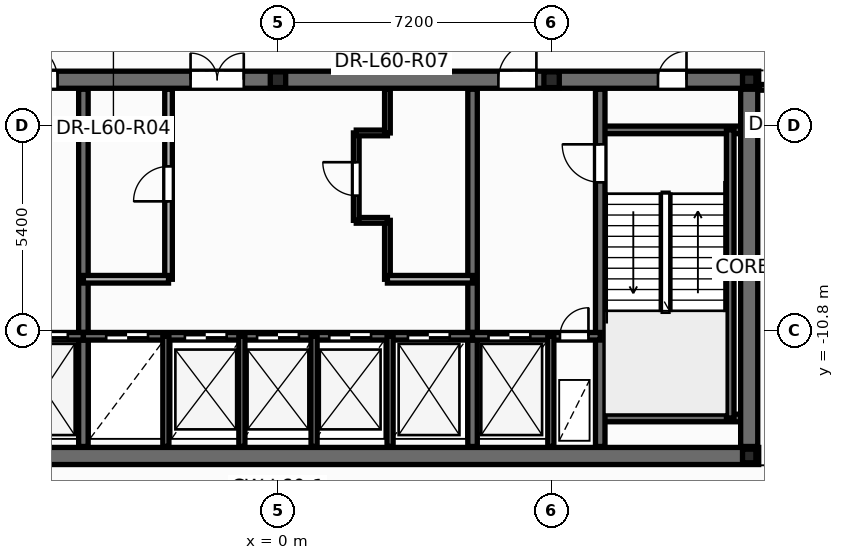
"""IFC4 building model, lengths in metres.
Left out: names, types, materials, properties, quantities, classifications, styles, units other than length and angle.
Written with IfcOpenShell. Run it as: python <this file> out.ifc"""

import sys

from ifc_helpers import new_model, si_unit, direction, frame, frame_2d, origin, origin_2d, place, context, subcontext, project, spatial, rectangle, i_section, extrude, element, fill, save


model = new_model("IFC4")
c1 = context("Model", 3, precision=1e-05, world=origin(), true_north=direction((0.0, 1.0)))
c2 = subcontext(c1, "Body", "Model", "MODEL_VIEW")
j1 = project(units=[si_unit("LENGTHUNIT", "METRE"), si_unit("PLANEANGLEUNIT", "RADIAN")], contexts=[c1])
p1 = place(None, origin())
s1 = spatial("IfcSite", under=j1, at=p1, CompositionType="ELEMENT")
p2 = place(p1, origin())
s2 = spatial("IfcBuilding", under=s1, at=p2, CompositionType="ELEMENT")
p3 = place(p2, frame((0.0, 0.0, 228.9)))
s3 = spatial("IfcBuildingStorey", under=s2, at=p3, CompositionType="ELEMENT", Elevation=228.9)
for number, where, z_axis, x_axis in (
    (1, (12.4, -14.1, 0.0), (0.0, 0.0, 1.0), (1.0, 0.0, 0.0)),
    (2, (12.4, -4.2, 0.0), (0.0, 0.0, 1.0), (1.0, 0.0, 0.0)),
):
    element("IfcColumn", number, at=place(p3, frame(where, z_axis=z_axis, x_axis=x_axis)), inside=s3, PredefinedType="COLUMN", context=c2, shape_type="SweptSolid", body=[
        extrude(i_section(OverallWidth=0.352, OverallDepth=0.359, WebThickness=0.018, FlangeThickness=0.026, at=origin_2d()), origin(), (0.0, 0.0, 1.0), 4.5),
    ])
for number, where, z_axis, x_axis in (
    (3, (0.0, -4.2, 0.0), (0.0, 0.0, 1.0), (1.0, 0.0, 0.0)),
    (4, (7.2, -4.2, 0.0), (0.0, 0.0, 1.0), (1.0, 0.0, 0.0)),
):
    element("IfcColumn", number, at=place(p3, frame(where, z_axis=z_axis, x_axis=x_axis)), inside=s3, PredefinedType="PILASTER", context=c2, shape_type="SweptSolid", body=[
        extrude(i_section(OverallWidth=0.405, OverallDepth=0.414, WebThickness=0.022, FlangeThickness=0.032, at=origin_2d()), origin(), (0.0, 0.0, 1.0), 4.5),
    ])
p4 = place(p3, frame((2.88, -9.45, 0.0), z_axis=(0.0, 0.0, 1.0), x_axis=(0.0, 1.0, 0.0)))
e5 = element("IfcWall", 5, at=p4, inside=s3, PredefinedType="PARTITIONING", context=c2, shape_type="SweptSolid", body=[
    extrude(rectangle(XDim=1.55, YDim=0.15, at=frame_2d((0.775, 0.0))), origin(), (0.0, 0.0, 1.0), 4.245),
])
p5 = place(p3, frame((2.06, -7.9, 0.0), z_axis=(0.0, 0.0, 1.0), x_axis=(1.0, 0.0, 0.0)))
e6 = element("IfcWall", 6, at=p5, inside=s3, PredefinedType="PARTITIONING", context=c2, shape_type="SweptSolid", body=[
    extrude(rectangle(XDim=0.82, YDim=0.15, at=frame_2d((0.41, 0.0))), origin(), (0.0, 0.0, 1.0), 4.245),
])
p6 = place(p3, frame((2.06, -7.9, 0.0), z_axis=(0.0, 0.0, 1.0), x_axis=(0.0, 1.0, 0.0)))
e7 = element("IfcWall", 7, at=p6, inside=s3, PredefinedType="PARTITIONING", context=c2, shape_type="SweptSolid", body=[
    extrude(rectangle(XDim=2.3, YDim=0.15, at=frame_2d((1.15, 0.0))), origin(), (0.0, 0.0, 1.0), 4.245),
])
p7 = place(p6, frame((0.65, 0.0, 0.0)))
e8 = element("IfcOpeningElement", 8, at=p7, cuts=e7, PredefinedType="OPENING", context=c2, shape_type="SweptSolid", body=[
    extrude(rectangle(XDim=0.886, YDim=2.104, at=frame_2d((0.44, 1.052))), frame((0.0, 0.085, 0.0), z_axis=(0.0, -1.0, 0.0), x_axis=(1.0, 0.0, 0.0)), (0.0, 0.0, 1.0), 0.17),
])
p8 = place(p3, frame((2.06, -5.6, 0.0), z_axis=(0.0, 0.0, 1.0), x_axis=(1.0, 0.0, 0.0)))
e9 = element("IfcWall", 9, at=p8, inside=s3, PredefinedType="PARTITIONING", context=c2, shape_type="SweptSolid", body=[
    extrude(rectangle(XDim=0.82, YDim=0.15, at=frame_2d((0.41, 0.0))), origin(), (0.0, 0.0, 1.0), 4.245),
])
p9 = place(p3, frame((2.88, -5.6, 0.0), z_axis=(0.0, 0.0, 1.0), x_axis=(0.0, 1.0, 0.0)))
e10 = element("IfcWall", 10, at=p9, inside=s3, PredefinedType="PARTITIONING", context=c2, shape_type="SweptSolid", body=[
    extrude(rectangle(XDim=1.15, YDim=0.15, at=frame_2d((0.575, 0.0))), origin(), (0.0, 0.0, 1.0), 4.245),
])
p10 = place(p3, frame((-12.65, -14.1, 0.0), z_axis=(0.0, 0.0, 1.0), x_axis=(1.0, 0.0, 0.0)))
e11 = element("IfcWall", 11, at=p10, inside=s3, PredefinedType="SHEAR", context=c2, shape_type="SweptSolid", body=[
    extrude(rectangle(XDim=25.3, YDim=0.45, at=frame_2d((12.65, 0.0))), origin(), (0.0, 0.0, 1.0), 4.5),
])
p11 = place(p3, frame((-12.65, -4.2, 0.0), z_axis=(0.0, 0.0, 1.0), x_axis=(1.0, 0.0, 0.0)))
e12 = element("IfcWall", 12, at=p11, inside=s3, PredefinedType="SHEAR", context=c2, shape_type="SweptSolid", body=[
    extrude(rectangle(XDim=25.3, YDim=0.45, at=frame_2d((12.65, 0.0))), origin(), (0.0, 0.0, 1.0), 4.5),
])
p12 = place(p11, frame((1.85, 0.0, 0.0)))
e13 = element("IfcOpeningElement", 13, at=p12, cuts=e12, PredefinedType="OPENING", context=c2, shape_type="SweptSolid", body=[
    extrude(rectangle(XDim=0.756, YDim=2.054, at=frame_2d((0.375, 1.027))), frame((0.0, 0.235, 0.0), z_axis=(0.0, -1.0, 0.0), x_axis=(1.0, 0.0, 0.0)), (0.0, 0.0, 1.0), 0.47),
])
p13 = place(p11, frame((22.65, 0.0, 0.0)))
e14 = element("IfcOpeningElement", 14, at=p13, cuts=e12, PredefinedType="OPENING", context=c2, shape_type="SweptSolid", body=[
    extrude(rectangle(XDim=0.756, YDim=2.054, at=frame_2d((0.375, 1.027))), frame((0.0, 0.235, 0.0), z_axis=(0.0, -1.0, 0.0), x_axis=(1.0, 0.0, 0.0)), (0.0, 0.0, 1.0), 0.47),
])
p14 = place(p11, frame((5.85, 0.0, 0.0)))
e15 = element("IfcOpeningElement", 15, at=p14, cuts=e12, PredefinedType="OPENING", context=c2, shape_type="SweptSolid", body=[
    extrude(rectangle(XDim=1.006, YDim=2.104, at=frame_2d((0.5, 1.052))), frame((0.0, 0.235, 0.0), z_axis=(0.0, -1.0, 0.0), x_axis=(1.0, 0.0, 0.0)), (0.0, 0.0, 1.0), 0.47),
])
p15 = place(p11, frame((10.35, 0.0, 0.0)))
e16 = element("IfcOpeningElement", 16, at=p15, cuts=e12, PredefinedType="OPENING", context=c2, shape_type="SweptSolid", body=[
    extrude(rectangle(XDim=1.406, YDim=2.154, at=frame_2d((0.7, 1.077))), frame((0.0, 0.235, 0.0), z_axis=(0.0, -1.0, 0.0), x_axis=(1.0, 0.0, 0.0)), (0.0, 0.0, 1.0), 0.47),
])
p16 = place(p11, frame((18.45, 0.0, 0.0)))
e17 = element("IfcOpeningElement", 17, at=p16, cuts=e12, PredefinedType="OPENING", context=c2, shape_type="SweptSolid", body=[
    extrude(rectangle(XDim=1.006, YDim=2.104, at=frame_2d((0.5, 1.052))), frame((0.0, 0.235, 0.0), z_axis=(0.0, -1.0, 0.0), x_axis=(1.0, 0.0, 0.0)), (0.0, 0.0, 1.0), 0.47),
])
for number, where, z_axis, x_axis in (
    (18, (8.48, -5.52, 0.0), (0.0, 0.0, 1.0), (1.0, 0.0, 0.0)),
    (19, (8.48, -13.1, 0.0), (0.0, 0.0, 1.0), (1.0, 0.0, 0.0)),
):
    element("IfcWall", number, at=place(p3, frame(where, z_axis=z_axis, x_axis=x_axis)), inside=s3, PredefinedType="SOLIDWALL", context=c2, shape_type="SweptSolid", body=[
        extrude(rectangle(XDim=3.87, YDim=0.2, at=frame_2d((1.935, 0.0))), origin(), (0.0, 0.0, 1.0), 4.5),
    ])
p17 = place(p3, frame((11.9, -13.1, 0.0), z_axis=(0.0, 0.0, 1.0), x_axis=(0.0, 1.0, 0.0)))
e20 = element("IfcWall", 20, at=p17, inside=s3, PredefinedType="SOLIDWALL", context=c2, shape_type="SweptSolid", body=[
    extrude(rectangle(XDim=7.58, YDim=0.2, at=frame_2d((3.79, 0.0))), origin(), (0.0, 0.0, 1.0), 4.5),
])
p18 = place(p3, frame((8.48, -13.85, 0.0), z_axis=(0.0, 0.0, 1.0), x_axis=(0.0, 1.0, 0.0)))
e21 = element("IfcWall", 21, at=p18, inside=s3, PredefinedType="SHEAR", context=c2, shape_type="SweptSolid", body=[
    extrude(rectangle(XDim=9.4, YDim=0.25, at=frame_2d((4.7, 0.0))), origin(), (0.0, 0.0, 1.0), 4.5),
])
p19 = place(p18, frame((6.95, 0.0, 0.0)))
e22 = element("IfcOpeningElement", 22, at=p19, cuts=e21, PredefinedType="OPENING", context=c2, shape_type="SweptSolid", body=[
    extrude(rectangle(XDim=1.006, YDim=2.104, at=frame_2d((0.5, 1.052))), frame((0.0, 0.135, 0.0), z_axis=(0.0, -1.0, 0.0), x_axis=(1.0, 0.0, 0.0)), (0.0, 0.0, 1.0), 0.27),
])
for number, where, z_axis, x_axis in (
    (23, (-5.12, -13.85, 0.0), (0.0, 0.0, 1.0), (0.0, 1.0, 0.0)),
    (24, (5.12, -13.85, 0.0), (0.0, 0.0, 1.0), (0.0, 1.0, 0.0)),
):
    element("IfcWall", number, at=place(p3, frame(where, z_axis=z_axis, x_axis=x_axis)), inside=s3, PredefinedType="SHEAR", context=c2, shape_type="SweptSolid", body=[
        extrude(rectangle(XDim=9.4, YDim=0.25, at=frame_2d((4.7, 0.0))), origin(), (0.0, 0.0, 1.0), 4.5),
    ])
p20 = place(p3, frame((-8.48, -10.95, 0.0), z_axis=(0.0, 0.0, 1.0), x_axis=(1.0, 0.0, 0.0)))
e25 = element("IfcWall", 25, at=p20, inside=s3, PredefinedType="SOLIDWALL", context=c2, shape_type="SweptSolid", body=[
    extrude(rectangle(XDim=3.36, YDim=0.2, at=frame_2d((1.68, 0.0))), origin(), (0.0, 0.0, 1.0), 4.5),
])
p21 = place(p20, frame((0.28, 0.0, 0.0)))
e26 = element("IfcOpeningElement", 26, at=p21, cuts=e25, PredefinedType="OPENING", context=c2, shape_type="SweptSolid", body=[
    extrude(rectangle(XDim=0.756, YDim=2.054, at=frame_2d((0.375, 1.027))), frame((0.0, 0.11, 0.0), z_axis=(0.0, -1.0, 0.0), x_axis=(1.0, 0.0, 0.0)), (0.0, 0.0, 1.0), 0.22),
])
p22 = place(p20, frame((1.85, 0.0, 0.0)))
e27 = element("IfcOpeningElement", 27, at=p22, cuts=e25, PredefinedType="OPENING", context=c2, shape_type="SweptSolid", body=[
    extrude(rectangle(XDim=1.106, YDim=2.104, at=frame_2d((0.55, 1.052))), frame((0.0, 0.11, 0.0), z_axis=(0.0, -1.0, 0.0), x_axis=(1.0, 0.0, 0.0)), (0.0, 0.0, 1.0), 0.22),
])
p23 = place(p3, frame((-5.12, -10.95, 0.0), z_axis=(0.0, 0.0, 1.0), x_axis=(1.0, 0.0, 0.0)))
e28 = element("IfcWall", 28, at=p23, inside=s3, PredefinedType="SOLIDWALL", context=c2, shape_type="SweptSolid", body=[
    extrude(rectangle(XDim=10.24, YDim=0.2, at=frame_2d((5.12, 0.0))), origin(), (0.0, 0.0, 1.0), 4.5),
])
p24 = place(p23, frame((0.6, 0.0, 0.0)))
e29 = element("IfcOpeningElement", 29, at=p24, cuts=e28, PredefinedType="OPENING", context=c2, shape_type="SweptSolid", body=[
    extrude(rectangle(XDim=1.106, YDim=2.104, at=frame_2d((0.55, 1.052))), frame((0.0, 0.11, 0.0), z_axis=(0.0, -1.0, 0.0), x_axis=(1.0, 0.0, 0.0)), (0.0, 0.0, 1.0), 0.22),
])
p25 = place(p23, frame((2.67, 0.0, 0.0)))
e30 = element("IfcOpeningElement", 30, at=p25, cuts=e28, PredefinedType="OPENING", context=c2, shape_type="SweptSolid", body=[
    extrude(rectangle(XDim=1.106, YDim=2.104, at=frame_2d((0.55, 1.052))), frame((0.0, 0.11, 0.0), z_axis=(0.0, -1.0, 0.0), x_axis=(1.0, 0.0, 0.0)), (0.0, 0.0, 1.0), 0.22),
])
p26 = place(p23, frame((4.57, 0.0, 0.0)))
e31 = element("IfcOpeningElement", 31, at=p26, cuts=e28, PredefinedType="OPENING", context=c2, shape_type="SweptSolid", body=[
    extrude(rectangle(XDim=1.106, YDim=2.104, at=frame_2d((0.55, 1.052))), frame((0.0, 0.11, 0.0), z_axis=(0.0, -1.0, 0.0), x_axis=(1.0, 0.0, 0.0)), (0.0, 0.0, 1.0), 0.22),
])
p27 = place(p23, frame((6.47, 0.0, 0.0)))
e32 = element("IfcOpeningElement", 32, at=p27, cuts=e28, PredefinedType="OPENING", context=c2, shape_type="SweptSolid", body=[
    extrude(rectangle(XDim=1.106, YDim=2.104, at=frame_2d((0.55, 1.052))), frame((0.0, 0.11, 0.0), z_axis=(0.0, -1.0, 0.0), x_axis=(1.0, 0.0, 0.0)), (0.0, 0.0, 1.0), 0.22),
])
p28 = place(p23, frame((8.54, 0.0, 0.0)))
e33 = element("IfcOpeningElement", 33, at=p28, cuts=e28, PredefinedType="OPENING", context=c2, shape_type="SweptSolid", body=[
    extrude(rectangle(XDim=1.106, YDim=2.104, at=frame_2d((0.55, 1.052))), frame((0.0, 0.11, 0.0), z_axis=(0.0, -1.0, 0.0), x_axis=(1.0, 0.0, 0.0)), (0.0, 0.0, 1.0), 0.22),
])
p29 = place(p3, frame((5.12, -10.95, 0.0), z_axis=(0.0, 0.0, 1.0), x_axis=(1.0, 0.0, 0.0)))
e34 = element("IfcWall", 34, at=p29, inside=s3, PredefinedType="SOLIDWALL", context=c2, shape_type="SweptSolid", body=[
    extrude(rectangle(XDim=3.36, YDim=0.2, at=frame_2d((1.68, 0.0))), origin(), (0.0, 0.0, 1.0), 4.5),
])
p30 = place(p29, frame((0.42, 0.0, 0.0)))
e35 = element("IfcOpeningElement", 35, at=p30, cuts=e34, PredefinedType="OPENING", context=c2, shape_type="SweptSolid", body=[
    extrude(rectangle(XDim=1.106, YDim=2.104, at=frame_2d((0.55, 1.052))), frame((0.0, 0.11, 0.0), z_axis=(0.0, -1.0, 0.0), x_axis=(1.0, 0.0, 0.0)), (0.0, 0.0, 1.0), 0.22),
])
p31 = place(p29, frame((2.3, 0.0, 0.0)))
e36 = element("IfcOpeningElement", 36, at=p31, cuts=e34, PredefinedType="OPENING", context=c2, shape_type="SweptSolid", body=[
    extrude(rectangle(XDim=0.756, YDim=2.054, at=frame_2d((0.375, 1.027))), frame((0.0, 0.11, 0.0), z_axis=(0.0, -1.0, 0.0), x_axis=(1.0, 0.0, 0.0)), (0.0, 0.0, 1.0), 0.22),
])
for number, where, z_axis, x_axis in (
    (37, (7.18, -13.85, 0.0), (0.0, 0.0, 1.0), (0.0, 1.0, 0.0)),
    (38, (-2.95, -13.85, 0.0), (0.0, 0.0, 1.0), (0.0, 1.0, 0.0)),
    (39, (2.95, -13.85, 0.0), (0.0, 0.0, 1.0), (0.0, 1.0, 0.0)),
):
    element("IfcWall", number, at=place(p3, frame(where, z_axis=z_axis, x_axis=x_axis)), inside=s3, PredefinedType="PARTITIONING", context=c2, shape_type="SweptSolid", body=[
        extrude(rectangle(XDim=2.9, YDim=0.16, at=frame_2d((1.45, 0.0))), origin(), (0.0, 0.0, 1.0), 3.47),
    ])
p32 = place(p3, frame((12.4, -13.85, 0.0), z_axis=(0.0, 0.0, 1.0), x_axis=(0.0, 1.0, 0.0)))
e40 = element("IfcWall", 40, at=p32, inside=s3, PredefinedType="SHEAR", context=c2, shape_type="SweptSolid", body=[
    extrude(rectangle(XDim=9.4, YDim=0.45, at=frame_2d((4.7, 0.0))), origin(), (0.0, 0.0, 1.0), 4.5),
])
p33 = place(p3, frame((-2.88, -9.45, 0.0), z_axis=(0.0, 0.0, 1.0), x_axis=(0.0, 1.0, 0.0)))
e41 = element("IfcWall", 41, at=p33, inside=s3, PredefinedType="SOLIDWALL", context=c2, shape_type="SweptSolid", body=[
    extrude(rectangle(XDim=5.0, YDim=0.2, at=frame_2d((2.5, 0.0))), origin(), (0.0, 0.0, 1.0), 4.245),
])
p34 = place(p33, frame((2.05, 0.0, 0.0)))
e42 = element("IfcOpeningElement", 42, at=p34, cuts=e41, PredefinedType="OPENING", context=c2, shape_type="SweptSolid", body=[
    extrude(rectangle(XDim=0.926, YDim=2.104, at=frame_2d((0.46, 1.052))), frame((0.0, 0.11, 0.0), z_axis=(0.0, -1.0, 0.0), x_axis=(1.0, 0.0, 0.0)), (0.0, 0.0, 1.0), 0.22),
])
for number, where, z_axis, x_axis in (
    (43, (-5.12, -9.45, 0.0), (0.0, 0.0, 1.0), (1.0, 0.0, 0.0)),
    (44, (2.88, -9.45, 0.0), (0.0, 0.0, 1.0), (1.0, 0.0, 0.0)),
):
    element("IfcWall", number, at=place(p3, frame(where, z_axis=z_axis, x_axis=x_axis)), inside=s3, PredefinedType="SOLIDWALL", context=c2, shape_type="SweptSolid", body=[
        extrude(rectangle(XDim=2.24, YDim=0.2, at=frame_2d((1.12, 0.0))), origin(), (0.0, 0.0, 1.0), 4.245),
    ])
for number, where, z_axis, x_axis in (
    (45, (-0.95, -13.85, 0.0), (0.0, 0.0, 1.0), (0.0, 1.0, 0.0)),
    (46, (0.95, -13.85, 0.0), (0.0, 0.0, 1.0), (0.0, 1.0, 0.0)),
):
    element("IfcWall", number, at=place(p3, frame(where, z_axis=z_axis, x_axis=x_axis)), inside=s3, PredefinedType="PARTITIONING", context=c2, shape_type="SweptSolid", body=[
        extrude(rectangle(XDim=2.9, YDim=0.16, at=frame_2d((1.45, 0.0))), origin(), (0.0, 0.0, 1.0), 3.47),
    ])
p35 = place(p3, frame((12.652, -4.4, 0.0), z_axis=(0.0, 0.0, 1.0), x_axis=(1.0, 0.0, 0.0)))
e47 = element("IfcWall", 47, at=p35, inside=s3, PredefinedType="PARTITIONING", context=c2, shape_type="SweptSolid", body=[
    extrude(rectangle(XDim=3.282, YDim=0.15, at=frame_2d((1.641, 0.0))), origin(), (0.0, 0.0, 1.0), 3.22),
])
p36 = place(p35, frame((0.763, 0.0, 0.0)))
e48 = element("IfcOpeningElement", 48, at=p36, cuts=e47, PredefinedType="OPENING", context=c2, shape_type="SweptSolid", body=[
    extrude(rectangle(XDim=0.956, YDim=2.104, at=frame_2d((0.475, 1.052))), frame((0.0, 0.085, 0.0), z_axis=(0.0, -1.0, 0.0), x_axis=(1.0, 0.0, 0.0)), (0.0, 0.0, 1.0), 0.17),
])
p37 = place(p34, origin())
e49 = element("IfcDoor", 49, at=p37, inside=s3, OperationType="SINGLE_SWING_LEFT", PredefinedType="DOOR", context=c2, shape_type="SweptSolid", body=[
    extrude(rectangle(XDim=0.92, YDim=2.1, at=frame_2d((0.46, 1.05))), frame((0.0, 0.025, 0.0), z_axis=(0.0, -1.0, 0.0), x_axis=(1.0, 0.0, 0.0)), (0.0, 0.0, 1.0), 0.05),
])
fill(e42, e49)
p38 = place(p7, origin())
e50 = element("IfcDoor", 50, at=p38, inside=s3, OperationType="SINGLE_SWING_RIGHT", PredefinedType="DOOR", context=c2, shape_type="SweptSolid", body=[
    extrude(rectangle(XDim=0.88, YDim=2.1, at=frame_2d((0.44, 1.05))), frame((0.0, 0.025, 0.0), z_axis=(0.0, -1.0, 0.0), x_axis=(1.0, 0.0, 0.0)), (0.0, 0.0, 1.0), 0.05),
])
fill(e8, e50)
p39 = place(p19, origin())
e51 = element("IfcDoor", 51, at=p39, inside=s3, OperationType="SINGLE_SWING_RIGHT", PredefinedType="DOOR", context=c2, shape_type="SweptSolid", body=[
    extrude(rectangle(XDim=1.0, YDim=2.1, at=frame_2d((0.5, 1.05))), frame((0.0, 0.025, 0.0), z_axis=(0.0, -1.0, 0.0), x_axis=(1.0, 0.0, 0.0)), (0.0, 0.0, 1.0), 0.05),
])
fill(e22, e51)
p40 = place(p22, origin())
e52 = element("IfcDoor", 52, at=p40, inside=s3, OperationType="DOUBLE_DOOR_SLIDING", PredefinedType="DOOR", context=c2, shape_type="SweptSolid", body=[
    extrude(rectangle(XDim=1.1, YDim=2.1, at=frame_2d((0.55, 1.05))), frame((0.0, 0.025, 0.0), z_axis=(0.0, -1.0, 0.0), x_axis=(1.0, 0.0, 0.0)), (0.0, 0.0, 1.0), 0.05),
])
fill(e27, e52)
p41 = place(p30, origin())
e53 = element("IfcDoor", 53, at=p41, inside=s3, OperationType="DOUBLE_DOOR_SLIDING", PredefinedType="DOOR", context=c2, shape_type="SweptSolid", body=[
    extrude(rectangle(XDim=1.1, YDim=2.1, at=frame_2d((0.55, 1.05))), frame((0.0, 0.025, 0.0), z_axis=(0.0, -1.0, 0.0), x_axis=(1.0, 0.0, 0.0)), (0.0, 0.0, 1.0), 0.05),
])
fill(e35, e53)
p42 = place(p31, origin())
e54 = element("IfcDoor", 54, at=p42, inside=s3, OperationType="SINGLE_SWING_RIGHT", PredefinedType="DOOR", context=c2, shape_type="SweptSolid", body=[
    extrude(rectangle(XDim=0.75, YDim=2.05, at=frame_2d((0.375, 1.025))), frame((0.0, 0.025, 0.0), z_axis=(0.0, -1.0, 0.0), x_axis=(1.0, 0.0, 0.0)), (0.0, 0.0, 1.0), 0.05),
])
fill(e36, e54)
p43 = place(p24, origin())
e55 = element("IfcDoor", 55, at=p43, inside=s3, OperationType="DOUBLE_DOOR_SLIDING", PredefinedType="DOOR", context=c2, shape_type="SweptSolid", body=[
    extrude(rectangle(XDim=1.1, YDim=2.1, at=frame_2d((0.55, 1.05))), frame((0.0, 0.025, 0.0), z_axis=(0.0, -1.0, 0.0), x_axis=(1.0, 0.0, 0.0)), (0.0, 0.0, 1.0), 0.05),
])
fill(e29, e55)
p44 = place(p25, origin())
e56 = element("IfcDoor", 56, at=p44, inside=s3, OperationType="DOUBLE_DOOR_SLIDING", PredefinedType="DOOR", context=c2, shape_type="SweptSolid", body=[
    extrude(rectangle(XDim=1.1, YDim=2.1, at=frame_2d((0.55, 1.05))), frame((0.0, 0.025, 0.0), z_axis=(0.0, -1.0, 0.0), x_axis=(1.0, 0.0, 0.0)), (0.0, 0.0, 1.0), 0.05),
])
fill(e30, e56)
p45 = place(p26, origin())
e57 = element("IfcDoor", 57, at=p45, inside=s3, OperationType="DOUBLE_DOOR_SLIDING", PredefinedType="DOOR", context=c2, shape_type="SweptSolid", body=[
    extrude(rectangle(XDim=1.1, YDim=2.1, at=frame_2d((0.55, 1.05))), frame((0.0, 0.025, 0.0), z_axis=(0.0, -1.0, 0.0), x_axis=(1.0, 0.0, 0.0)), (0.0, 0.0, 1.0), 0.05),
])
fill(e31, e57)
p46 = place(p27, origin())
e58 = element("IfcDoor", 58, at=p46, inside=s3, OperationType="DOUBLE_DOOR_SLIDING", PredefinedType="DOOR", context=c2, shape_type="SweptSolid", body=[
    extrude(rectangle(XDim=1.1, YDim=2.1, at=frame_2d((0.55, 1.05))), frame((0.0, 0.025, 0.0), z_axis=(0.0, -1.0, 0.0), x_axis=(1.0, 0.0, 0.0)), (0.0, 0.0, 1.0), 0.05),
])
fill(e32, e58)
p47 = place(p28, origin())
e59 = element("IfcDoor", 59, at=p47, inside=s3, OperationType="DOUBLE_DOOR_SLIDING", PredefinedType="DOOR", context=c2, shape_type="SweptSolid", body=[
    extrude(rectangle(XDim=1.1, YDim=2.1, at=frame_2d((0.55, 1.05))), frame((0.0, 0.025, 0.0), z_axis=(0.0, -1.0, 0.0), x_axis=(1.0, 0.0, 0.0)), (0.0, 0.0, 1.0), 0.05),
])
fill(e33, e59)
p48 = place(p13, origin())
e60 = element("IfcDoor", 60, at=p48, inside=s3, OperationType="SINGLE_SWING_RIGHT", PredefinedType="DOOR", context=c2, shape_type="SweptSolid", body=[
    extrude(rectangle(XDim=0.75, YDim=2.05, at=frame_2d((0.375, 1.025))), frame((0.0, 0.025, 0.0), z_axis=(0.0, -1.0, 0.0), x_axis=(1.0, 0.0, 0.0)), (0.0, 0.0, 1.0), 0.05),
])
fill(e14, e60)
p49 = place(p14, origin())
e61 = element("IfcDoor", 61, at=p49, inside=s3, OperationType="SINGLE_SWING_LEFT", PredefinedType="DOOR", context=c2, shape_type="SweptSolid", body=[
    extrude(rectangle(XDim=1.0, YDim=2.1, at=frame_2d((0.5, 1.05))), frame((0.0, 0.025, 0.0), z_axis=(0.0, -1.0, 0.0), x_axis=(1.0, 0.0, 0.0)), (0.0, 0.0, 1.0), 0.05),
])
fill(e15, e61)
p50 = place(p15, origin())
e62 = element("IfcDoor", 62, at=p50, inside=s3, OperationType="DOUBLE_DOOR_SINGLE_SWING", PredefinedType="DOOR", context=c2, shape_type="SweptSolid", body=[
    extrude(rectangle(XDim=1.4, YDim=2.15, at=frame_2d((0.7, 1.075))), frame((0.0, 0.025, 0.0), z_axis=(0.0, -1.0, 0.0), x_axis=(1.0, 0.0, 0.0)), (0.0, 0.0, 1.0), 0.05),
])
fill(e16, e62)
p51 = place(p16, origin())
e63 = element("IfcDoor", 63, at=p51, inside=s3, OperationType="SINGLE_SWING_RIGHT", PredefinedType="DOOR", context=c2, shape_type="SweptSolid", body=[
    extrude(rectangle(XDim=1.0, YDim=2.1, at=frame_2d((0.5, 1.05))), frame((0.0, 0.025, 0.0), z_axis=(0.0, -1.0, 0.0), x_axis=(1.0, 0.0, 0.0)), (0.0, 0.0, 1.0), 0.05),
])
fill(e17, e63)
save(model, sys.argv[1])
